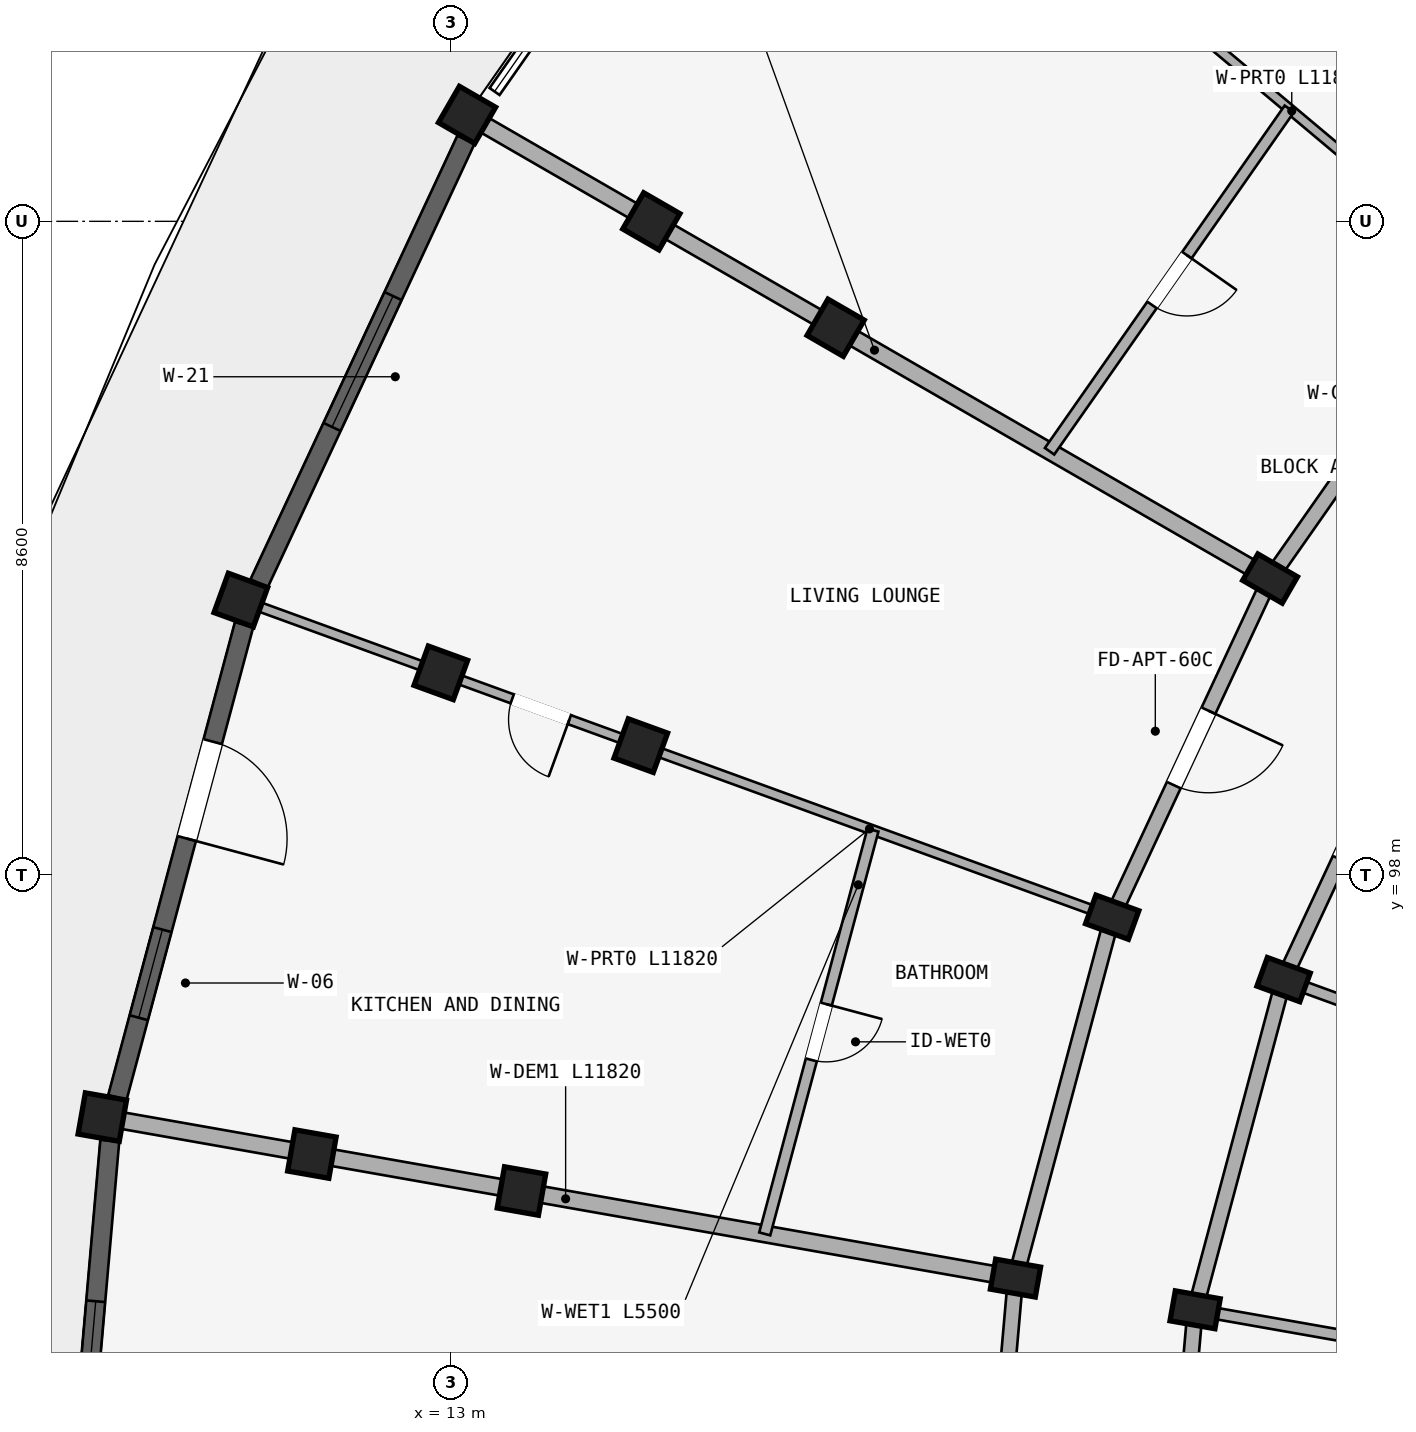
"""IFC4 building model, lengths in metres.
Left out: names, types, materials, properties, quantities, classifications, styles, units other than length and angle.
Written with IfcOpenShell. Run it as: python <this file> out.ifc"""

import sys

from ifc_helpers import new_model, si_unit, direction, frame, frame_2d, origin, origin_2d, place, context, subcontext, project, spatial, rectangle, extrude, element, fill, save


model = new_model("IFC4")
c1 = context("Model", 3, precision=1e-05, world=origin(), true_north=direction((0.0, 1.0)))
c2 = subcontext(c1, "Body", "Model", "MODEL_VIEW")
j1 = project(units=[si_unit("LENGTHUNIT", "METRE"), si_unit("PLANEANGLEUNIT", "RADIAN")], contexts=[c1])
p1 = place(None, origin())
s1 = spatial("IfcSite", under=j1, at=p1, CompositionType="ELEMENT")
p2 = place(p1, origin())
s2 = spatial("IfcBuilding", under=s1, at=p2, CompositionType="ELEMENT")
p3 = place(p2, frame((0.0, 0.0, 43.35)))
s3 = spatial("IfcBuildingStorey", under=s2, at=p3, CompositionType="ELEMENT", Elevation=43.35)
p4 = place(p3, frame((23.778, 101.9, 0.0), z_axis=(0.0, 0.0, 1.0), x_axis=(0.5, 0.866025403784, 0.0)))
e1 = element("IfcColumn", 1, at=p4, inside=s3, PredefinedType="COLUMN", context=c2, shape_type="SweptSolid", body=[
    extrude(rectangle(XDim=0.4, YDim=0.6, at=origin_2d()), origin(), (0.0, 0.0, 1.0), 2.93),
])
for number, where, z_axis, x_axis in (
    (2, (18.062, 105.2, 0.0), (0.0, 0.0, 1.0), (0.5, 0.866, 0.0)),
    (3, (15.637, 106.6, 0.0), (0.0, 0.0, 1.0), (0.5, 0.866, 0.0)),
):
    element("IfcColumn", number, at=place(p3, frame(where, z_axis=z_axis, x_axis=x_axis)), inside=s3, PredefinedType="COLUMN", context=c2, shape_type="SweptSolid", body=[
        extrude(rectangle(XDim=0.55, YDim=0.55, at=origin_2d()), origin(), (0.0, 0.0, 1.0), 2.93),
    ])
p5 = place(p3, frame((13.213, 108.0, 0.0), z_axis=(0.0, 0.0, 1.0), x_axis=(0.5, 0.866025403784, 0.0)))
e4 = element("IfcColumn", 4, at=p5, inside=s3, PredefinedType="COLUMN", context=c2, shape_type="SweptSolid", body=[
    extrude(rectangle(XDim=0.55, YDim=0.55, at=origin_2d()), origin(), (0.0, 0.0, 1.0), 2.97),
])
for number, where, z_axis, x_axis in (
    (5, (23.956, 96.624, 0.0), (0.0, 0.0, 1.0), (0.342, 0.94, 0.0)),
    (6, (21.701, 97.445, 0.0), (0.0, 0.0, 1.0), (0.342, 0.94, 0.0)),
):
    element("IfcColumn", number, at=place(p3, frame(where, z_axis=z_axis, x_axis=x_axis)), inside=s3, PredefinedType="COLUMN", context=c2, shape_type="SweptSolid", body=[
        extrude(rectangle(XDim=0.4, YDim=0.6, at=origin_2d()), origin(), (0.0, 0.0, 1.0), 2.93),
    ])
for number, where, z_axis, x_axis in (
    (7, (15.499, 99.702, 0.0), (0.0, 0.0, 1.0), (0.342, 0.94, 0.0)),
    (8, (12.868, 100.66, 0.0), (0.0, 0.0, 1.0), (0.342, 0.94, 0.0)),
):
    element("IfcColumn", number, at=place(p3, frame(where, z_axis=z_axis, x_axis=x_axis)), inside=s3, PredefinedType="COLUMN", context=c2, shape_type="SweptSolid", body=[
        extrude(rectangle(XDim=0.55, YDim=0.55, at=origin_2d()), origin(), (0.0, 0.0, 1.0), 2.93),
    ])
p6 = place(p3, frame((10.236, 101.618, 0.0), z_axis=(0.0, 0.0, 1.0), x_axis=(0.342020143326, 0.939692620786, 0.0)))
e9 = element("IfcColumn", 9, at=p6, inside=s3, PredefinedType="COLUMN", context=c2, shape_type="SweptSolid", body=[
    extrude(rectangle(XDim=0.55, YDim=0.55, at=origin_2d()), origin(), (0.0, 0.0, 1.0), 2.97),
])
for number, where, z_axis, x_axis in (
    (10, (22.792, 92.28, 0.0), (0.0, 0.0, 1.0), (0.174, 0.985, 0.0)),
    (11, (20.428, 92.697, 0.0), (0.0, 0.0, 1.0), (0.174, 0.985, 0.0)),
):
    element("IfcColumn", number, at=place(p3, frame(where, z_axis=z_axis, x_axis=x_axis)), inside=s3, PredefinedType="COLUMN", context=c2, shape_type="SweptSolid", body=[
        extrude(rectangle(XDim=0.4, YDim=0.6, at=origin_2d()), origin(), (0.0, 0.0, 1.0), 2.93),
    ])
for number, where, z_axis, x_axis in (
    (12, (13.929, 93.843, 0.0), (0.0, 0.0, 1.0), (0.174, 0.985, 0.0)),
    (13, (11.171, 94.329, 0.0), (0.0, 0.0, 1.0), (0.174, 0.985, 0.0)),
):
    element("IfcColumn", number, at=place(p3, frame(where, z_axis=z_axis, x_axis=x_axis)), inside=s3, PredefinedType="COLUMN", context=c2, shape_type="SweptSolid", body=[
        extrude(rectangle(XDim=0.55, YDim=0.55, at=origin_2d()), origin(), (0.0, 0.0, 1.0), 2.93),
    ])
p7 = place(p3, frame((8.414, 94.815, 0.0), z_axis=(0.0, 0.0, 1.0), x_axis=(0.173648177667, 0.984807753012, 0.0)))
e14 = element("IfcColumn", 14, at=p7, inside=s3, PredefinedType="COLUMN", context=c2, shape_type="SweptSolid", body=[
    extrude(rectangle(XDim=0.55, YDim=0.55, at=origin_2d()), origin(), (0.0, 0.0, 1.0), 2.97),
])
p8 = place(p3, frame((26.598, 105.927, 0.0), z_axis=(0.0, 0.0, 1.0), x_axis=(-0.573592335331, -0.819140911474, 0.0)))
e15 = element("IfcWall", 15, at=p8, inside=s3, PredefinedType="STANDARD", context=c2, shape_type="SweptSolid", body=[
    extrude(rectangle(XDim=4.916, YDim=0.2, at=frame_2d((2.458, 0.0))), origin(), (0.0, 0.0, 1.0), 2.372),
])
p9 = place(p3, frame((25.856, 100.7, 0.0), z_axis=(0.0, 0.0, 1.0), x_axis=(-0.422617978463, -0.906307919131, 0.0)))
e16 = element("IfcWall", 16, at=p9, inside=s3, PredefinedType="STANDARD", context=c2, shape_type="SweptSolid", body=[
    extrude(rectangle(XDim=4.497, YDim=0.2, at=frame_2d((2.249, 0.0))), origin(), (0.0, 0.0, 1.0), 2.372),
])
p10 = place(p9, frame((1.749, 0.0, 0.0)))
e17 = element("IfcOpeningElement", 17, at=p10, cuts=e16, PredefinedType="OPENING", context=c2, shape_type="SweptSolid", body=[
    extrude(rectangle(XDim=1.0, YDim=2.15, at=frame_2d((0.5, 1.075))), frame((0.0, 0.11, 0.0), z_axis=(0.0, -1.0, 0.0), x_axis=(1.0, 0.0, 0.0)), (0.0, 0.0, 1.0), 0.22),
])
p11 = place(p3, frame((23.778, 101.9, 0.0), z_axis=(0.0, 0.0, 1.0), x_axis=(-0.422629854778, -0.906302381024, 0.0)))
e18 = element("IfcWall", 18, at=p11, inside=s3, PredefinedType="STANDARD", context=c2, shape_type="SweptSolid", body=[
    extrude(rectangle(XDim=4.915, YDim=0.2, at=frame_2d((2.458, 0.0))), origin(), (0.0, 0.0, 1.0), 2.372),
])
p12 = place(p11, frame((1.918, 0.0, 0.0)))
e19 = element("IfcOpeningElement", 19, at=p12, cuts=e18, PredefinedType="OPENING", context=c2, shape_type="SweptSolid", body=[
    extrude(rectangle(XDim=1.08, YDim=2.15, at=frame_2d((0.54, 1.075))), frame((0.0, 0.11, 0.0), z_axis=(0.0, -1.0, 0.0), x_axis=(1.0, 0.0, 0.0)), (0.0, 0.0, 1.0), 0.22),
])
p13 = place(p3, frame((23.956, 96.624, 0.0), z_axis=(0.0, 0.0, 1.0), x_axis=(-0.258787642463, -0.965934240054, 0.0)))
e20 = element("IfcWall", 20, at=p13, inside=s3, PredefinedType="STANDARD", context=c2, shape_type="SweptSolid", body=[
    extrude(rectangle(XDim=4.497, YDim=0.2, at=frame_2d((2.249, 0.0))), origin(), (0.0, 0.0, 1.0), 2.372),
])
p14 = place(p3, frame((21.701, 97.445, 0.0), z_axis=(0.0, 0.0, 1.0), x_axis=(-0.258803112091, -0.965930095386, 0.0)))
e21 = element("IfcWall", 21, at=p14, inside=s3, PredefinedType="STANDARD", context=c2, shape_type="SweptSolid", body=[
    extrude(rectangle(XDim=4.916, YDim=0.2, at=frame_2d((2.458, 0.0))), origin(), (0.0, 0.0, 1.0), 2.372),
])
p15 = place(p3, frame((22.792, 92.28, 0.0), z_axis=(0.0, 0.0, 1.0), x_axis=(-0.087187153726, -0.996191949488, 0.0)))
e22 = element("IfcWall", 22, at=p15, inside=s3, PredefinedType="STANDARD", context=c2, shape_type="SweptSolid", body=[
    extrude(rectangle(XDim=4.497, YDim=0.2, at=frame_2d((2.249, 0.0))), origin(), (0.0, 0.0, 1.0), 2.372),
])
p16 = place(p3, frame((20.428, 92.697, 0.0), z_axis=(0.0, 0.0, 1.0), x_axis=(-0.087167566415, -0.996193663584, 0.0)))
e23 = element("IfcWall", 23, at=p16, inside=s3, PredefinedType="STANDARD", context=c2, shape_type="SweptSolid", body=[
    extrude(rectangle(XDim=4.916, YDim=0.2, at=frame_2d((2.458, 0.0))), origin(), (0.0, 0.0, 1.0), 2.372),
])
p17 = place(p16, frame((1.888, 0.0, 0.0)))
e24 = element("IfcOpeningElement", 24, at=p17, cuts=e23, PredefinedType="OPENING", context=c2, shape_type="SweptSolid", body=[
    extrude(rectangle(XDim=1.14, YDim=2.15, at=frame_2d((0.57, 1.075))), frame((0.0, 0.11, 0.0), z_axis=(0.0, -1.0, 0.0), x_axis=(1.0, 0.0, 0.0)), (0.0, 0.0, 1.0), 0.22),
])
p18 = place(p3, frame((26.521, 105.991, 0.0), z_axis=(0.0, 0.0, 1.0), x_axis=(-0.766049804211, 0.642781220531, 0.0)))
e25 = element("IfcWall", 25, at=p18, inside=s3, PredefinedType="PARTITIONING", context=c2, shape_type="SweptSolid", body=[
    extrude(rectangle(XDim=11.82, YDim=0.125, at=frame_2d((5.91, 0.0))), origin(), (0.0, 0.0, 1.0), 2.372),
])
p19 = place(p18, frame((7.5, 0.0, 0.0)))
e26 = element("IfcOpeningElement", 26, at=p19, cuts=e25, PredefinedType="OPENING", context=c2, shape_type="SweptSolid", body=[
    extrude(rectangle(XDim=0.8, YDim=2.1, at=frame_2d((0.4, 1.05))), frame((0.0, 0.073, 0.0), z_axis=(0.0, -1.0, 0.0), x_axis=(1.0, 0.0, 0.0)), (0.0, 0.0, 1.0), 0.145),
])
p20 = place(p3, frame((23.691, 101.95, 0.0), z_axis=(0.0, 0.0, 1.0), x_axis=(-0.866017730655, 0.500013290014, 0.0)))
e27 = element("IfcWall", 27, at=p20, inside=s3, PredefinedType="STANDARD", context=c2, shape_type="SweptSolid", body=[
    extrude(rectangle(XDim=11.82, YDim=0.22, at=frame_2d((5.91, 0.0))), origin(), (0.0, 0.0, 1.0), 2.372),
])
p21 = place(p3, frame((30.346, 94.298, 0.0), z_axis=(0.0, 0.0, 1.0), x_axis=(-0.939696231917, 0.342010221662, 0.0)))
e28 = element("IfcWall", 28, at=p21, inside=s3, PredefinedType="PARTITIONING", context=c2, shape_type="SweptSolid", body=[
    extrude(rectangle(XDim=6.75, YDim=0.15, at=frame_2d((3.375, 0.0))), origin(), (0.0, 0.0, 1.0), 2.372),
])
p22 = place(p21, frame((3.262, 0.0, 0.0)))
e29 = element("IfcOpeningElement", 29, at=p22, cuts=e28, PredefinedType="OPENING", context=c2, shape_type="SweptSolid", body=[
    extrude(rectangle(XDim=0.9, YDim=2.1, at=frame_2d((0.45, 1.05))), frame((0.0, 0.085, 0.0), z_axis=(0.0, -1.0, 0.0), x_axis=(1.0, 0.0, 0.0)), (0.0, 0.0, 1.0), 0.17),
])
p23 = place(p3, frame((21.607, 97.479, 0.0), z_axis=(0.0, 0.0, 1.0), x_axis=(-0.939698102693, 0.342005081534, 0.0)))
e30 = element("IfcWall", 30, at=p23, inside=s3, PredefinedType="PARTITIONING", context=c2, shape_type="SweptSolid", body=[
    extrude(rectangle(XDim=11.82, YDim=0.125, at=frame_2d((5.91, 0.0))), origin(), (0.0, 0.0, 1.0), 2.372),
])
p24 = place(p23, frame((7.5, 0.0, 0.0)))
e31 = element("IfcOpeningElement", 31, at=p24, cuts=e30, PredefinedType="OPENING", context=c2, shape_type="SweptSolid", body=[
    extrude(rectangle(XDim=0.8, YDim=2.1, at=frame_2d((0.4, 1.05))), frame((0.0, 0.073, 0.0), z_axis=(0.0, -1.0, 0.0), x_axis=(1.0, 0.0, 0.0)), (0.0, 0.0, 1.0), 0.145),
])
p25 = place(p3, frame((29.489, 91.099, 0.0), z_axis=(0.0, 0.0, 1.0), x_axis=(-0.984807944945, 0.173647089161, 0.0)))
e32 = element("IfcWall", 32, at=p25, inside=s3, PredefinedType="PARTITIONING", context=c2, shape_type="SweptSolid", body=[
    extrude(rectangle(XDim=6.75, YDim=0.15, at=frame_2d((3.375, 0.0))), origin(), (0.0, 0.0, 1.0), 2.372),
])
p26 = place(p25, frame((3.242, 0.0, 0.0)))
e33 = element("IfcOpeningElement", 33, at=p26, cuts=e32, PredefinedType="OPENING", context=c2, shape_type="SweptSolid", body=[
    extrude(rectangle(XDim=0.94, YDim=2.1, at=frame_2d((0.47, 1.05))), frame((0.0, 0.085, 0.0), z_axis=(0.0, -1.0, 0.0), x_axis=(1.0, 0.0, 0.0)), (0.0, 0.0, 1.0), 0.17),
])
p27 = place(p3, frame((20.33, 92.714, 0.0), z_axis=(0.0, 0.0, 1.0), x_axis=(-0.984808085438, 0.173646292378, 0.0)))
e34 = element("IfcWall", 34, at=p27, inside=s3, PredefinedType="STANDARD", context=c2, shape_type="SweptSolid", body=[
    extrude(rectangle(XDim=11.82, YDim=0.22, at=frame_2d((5.91, 0.0))), origin(), (0.0, 0.0, 1.0), 2.372),
])
p28 = place(p3, frame((24.031, 108.08, 0.0), z_axis=(0.0, 0.0, 1.0), x_axis=(-0.573569599955, -0.819156831143, 0.0)))
e35 = element("IfcWall", 35, at=p28, inside=s3, PredefinedType="PLUMBINGWALL", context=c2, shape_type="SweptSolid", body=[
    extrude(rectangle(XDim=5.5, YDim=0.15, at=frame_2d((2.75, 0.0))), origin(), (0.0, 0.0, 1.0), 2.372),
])
p29 = place(p28, frame((2.35, 0.0, 0.0)))
e36 = element("IfcOpeningElement", 36, at=p29, cuts=e35, PredefinedType="OPENING", context=c2, shape_type="SweptSolid", body=[
    extrude(rectangle(XDim=0.8, YDim=2.1, at=frame_2d((0.4, 1.05))), frame((0.0, 0.085, 0.0), z_axis=(0.0, -1.0, 0.0), x_axis=(1.0, 0.0, 0.0)), (0.0, 0.0, 1.0), 0.17),
])
p30 = place(p3, frame((18.553, 98.591, 0.0), z_axis=(0.0, 0.0, 1.0), x_axis=(-0.258806351229, -0.965929227513, 0.0)))
e37 = element("IfcWall", 37, at=p30, inside=s3, PredefinedType="PLUMBINGWALL", context=c2, shape_type="SweptSolid", body=[
    extrude(rectangle(XDim=5.5, YDim=0.15, at=frame_2d((2.75, 0.0))), origin(), (0.0, 0.0, 1.0), 2.372),
])
p31 = place(p30, frame((2.37, 0.0, 0.0)))
e38 = element("IfcOpeningElement", 38, at=p31, cuts=e37, PredefinedType="OPENING", context=c2, shape_type="SweptSolid", body=[
    extrude(rectangle(XDim=0.76, YDim=2.05, at=frame_2d((0.38, 1.025))), frame((0.0, 0.085, 0.0), z_axis=(0.0, -1.0, 0.0), x_axis=(1.0, 0.0, 0.0)), (0.0, 0.0, 1.0), 0.17),
])
p32 = place(p3, frame((13.199, 107.675, 0.0), z_axis=(0.0, 0.0, 1.0), x_axis=(-0.422590788426, -0.906320597547, 0.0)))
e39 = element("IfcWall", 39, at=p32, inside=s3, PredefinedType="STANDARD", context=c2, shape_type="SweptSolid", body=[
    extrude(rectangle(XDim=6.441, YDim=0.25, at=frame_2d((3.22, 0.0))), origin(), (0.0, 0.0, 1.0), 2.412),
])
p33 = place(p32, frame((2.271, 0.0, 0.462)))
e40 = element("IfcOpeningElement", 40, at=p33, cuts=e39, PredefinedType="OPENING", context=c2, shape_type="SweptSolid", body=[
    extrude(rectangle(XDim=1.9, YDim=1.75, at=frame_2d((0.95, 0.875))), frame((0.0, 0.135, 0.0), z_axis=(0.0, -1.0, 0.0), x_axis=(1.0, 0.0, 0.0)), (0.0, 0.0, 1.0), 0.27),
])
p34 = place(p3, frame((10.279, 101.295, 0.0), z_axis=(0.0, 0.0, 1.0), x_axis=(-0.258804290367, -0.965929779688, 0.0)))
e41 = element("IfcWall", 41, at=p34, inside=s3, PredefinedType="STANDARD", context=c2, shape_type="SweptSolid", body=[
    extrude(rectangle(XDim=6.441, YDim=0.25, at=frame_2d((3.221, 0.0))), origin(), (0.0, 0.0, 1.0), 2.412),
])
p35 = place(p34, frame((4.155, 0.0, 0.562)))
e42 = element("IfcOpeningElement", 42, at=p35, cuts=e41, PredefinedType="OPENING", context=c2, shape_type="SweptSolid", body=[
    extrude(rectangle(XDim=1.2, YDim=1.5, at=frame_2d((0.6, 0.75))), frame((0.0, 0.135, 0.0), z_axis=(0.0, -1.0, 0.0), x_axis=(1.0, 0.0, 0.0)), (0.0, 0.0, 1.0), 0.27),
])
p36 = place(p34, frame((1.594, 0.0, 0.0)))
e43 = element("IfcOpeningElement", 43, at=p36, cuts=e41, PredefinedType="OPENING", context=c2, shape_type="SweptSolid", body=[
    extrude(rectangle(XDim=1.32, YDim=2.15, at=frame_2d((0.66, 1.075))), frame((0.0, 0.135, 0.0), z_axis=(0.0, -1.0, 0.0), x_axis=(1.0, 0.0, 0.0)), (0.0, 0.0, 1.0), 0.27),
])
p37 = place(p3, frame((8.512, 94.505, 0.0), z_axis=(0.0, 0.0, 1.0), x_axis=(-0.087179175472, -0.996192647716, 0.0)))
e44 = element("IfcWall", 44, at=p37, inside=s3, PredefinedType="STANDARD", context=c2, shape_type="SweptSolid", body=[
    extrude(rectangle(XDim=6.441, YDim=0.25, at=frame_2d((3.22, 0.0))), origin(), (0.0, 0.0, 1.0), 2.412),
])
p38 = place(p37, frame((2.121, 0.0, 0.312)))
e45 = element("IfcOpeningElement", 45, at=p38, cuts=e44, PredefinedType="OPENING", context=c2, shape_type="SweptSolid", body=[
    extrude(rectangle(XDim=2.2, YDim=1.9, at=frame_2d((1.1, 0.95))), frame((0.0, 0.135, 0.0), z_axis=(0.0, -1.0, 0.0), x_axis=(1.0, 0.0, 0.0)), (0.0, 0.0, 1.0), 0.27),
])
p39 = place(p33, origin())
e46 = element("IfcWindow", 46, at=p39, inside=s3, PartitioningType="DOUBLE_PANEL_VERTICAL", PredefinedType="WINDOW", context=c2, shape_type="SweptSolid", body=[
    extrude(rectangle(XDim=1.9, YDim=1.75, at=frame_2d((0.95, 0.875))), frame((0.0, 0.03, 0.0), z_axis=(0.0, -1.0, 0.0), x_axis=(1.0, 0.0, 0.0)), (0.0, 0.0, 1.0), 0.06),
])
fill(e40, e46)
p40 = place(p35, origin())
e47 = element("IfcWindow", 47, at=p40, inside=s3, PartitioningType="SINGLE_PANEL", PredefinedType="WINDOW", context=c2, shape_type="SweptSolid", body=[
    extrude(rectangle(XDim=1.2, YDim=1.5, at=frame_2d((0.6, 0.75))), frame((0.0, 0.03, 0.0), z_axis=(0.0, -1.0, 0.0), x_axis=(1.0, 0.0, 0.0)), (0.0, 0.0, 1.0), 0.06),
])
fill(e42, e47)
p41 = place(p38, origin())
e48 = element("IfcWindow", 48, at=p41, inside=s3, PartitioningType="TRIPLE_PANEL_VERTICAL", PredefinedType="WINDOW", context=c2, shape_type="SweptSolid", body=[
    extrude(rectangle(XDim=2.2, YDim=1.9, at=frame_2d((1.1, 0.95))), frame((0.0, 0.03, 0.0), z_axis=(0.0, -1.0, 0.0), x_axis=(1.0, 0.0, 0.0)), (0.0, 0.0, 1.0), 0.06),
])
fill(e45, e48)
p42 = place(p24, frame((0.8, 0.0, 0.0), z_axis=(0.0, 0.0, 1.0), x_axis=(-1.0, 0.0, 0.0)))
e49 = element("IfcDoor", 49, at=p42, inside=s3, OperationType="SINGLE_SWING_RIGHT", PredefinedType="DOOR", context=c2, shape_type="SweptSolid", body=[
    extrude(rectangle(XDim=0.8, YDim=2.1, at=frame_2d((0.4, 1.05))), frame((0.0, 0.025, 0.0), z_axis=(0.0, -1.0, 0.0), x_axis=(1.0, 0.0, 0.0)), (0.0, 0.0, 1.0), 0.05),
])
fill(e31, e49)
p43 = place(p29, frame((0.8, 0.0, 0.0), z_axis=(0.0, 0.0, 1.0), x_axis=(-1.0, 0.0, 0.0)))
e50 = element("IfcDoor", 50, at=p43, inside=s3, OperationType="SINGLE_SWING_RIGHT", PredefinedType="DOOR", context=c2, shape_type="SweptSolid", body=[
    extrude(rectangle(XDim=0.8, YDim=2.1, at=frame_2d((0.4, 1.05))), frame((0.0, 0.025, 0.0), z_axis=(0.0, -1.0, 0.0), x_axis=(1.0, 0.0, 0.0)), (0.0, 0.0, 1.0), 0.05),
])
fill(e36, e50)
p44 = place(p12, origin())
e51 = element("IfcDoor", 51, at=p44, inside=s3, OperationType="SINGLE_SWING_LEFT", PredefinedType="DOOR", context=c2, shape_type="SweptSolid", body=[
    extrude(rectangle(XDim=1.08, YDim=2.15, at=frame_2d((0.54, 1.075))), frame((0.0, 0.025, 0.0), z_axis=(0.0, -1.0, 0.0), x_axis=(1.0, 0.0, 0.0)), (0.0, 0.0, 1.0), 0.05),
])
fill(e19, e51)
p45 = place(p31, frame((0.76, 0.0, 0.0), z_axis=(0.0, 0.0, 1.0), x_axis=(-1.0, 0.0, 0.0)))
e52 = element("IfcDoor", 52, at=p45, inside=s3, OperationType="SINGLE_SWING_RIGHT", PredefinedType="DOOR", context=c2, shape_type="SweptSolid", body=[
    extrude(rectangle(XDim=0.76, YDim=2.05, at=frame_2d((0.38, 1.025))), frame((0.0, 0.025, 0.0), z_axis=(0.0, -1.0, 0.0), x_axis=(1.0, 0.0, 0.0)), (0.0, 0.0, 1.0), 0.05),
])
fill(e38, e52)
p46 = place(p36, frame((1.32, 0.0, 0.0), z_axis=(0.0, 0.0, 1.0), x_axis=(-1.0, 0.0, 0.0)))
e53 = element("IfcDoor", 53, at=p46, inside=s3, OperationType="SINGLE_SWING_LEFT", PredefinedType="DOOR", context=c2, shape_type="SweptSolid", body=[
    extrude(rectangle(XDim=1.32, YDim=2.15, at=frame_2d((0.66, 1.075))), frame((0.0, 0.025, 0.0), z_axis=(0.0, -1.0, 0.0), x_axis=(1.0, 0.0, 0.0)), (0.0, 0.0, 1.0), 0.05),
])
fill(e43, e53)
save(model, sys.argv[1])
